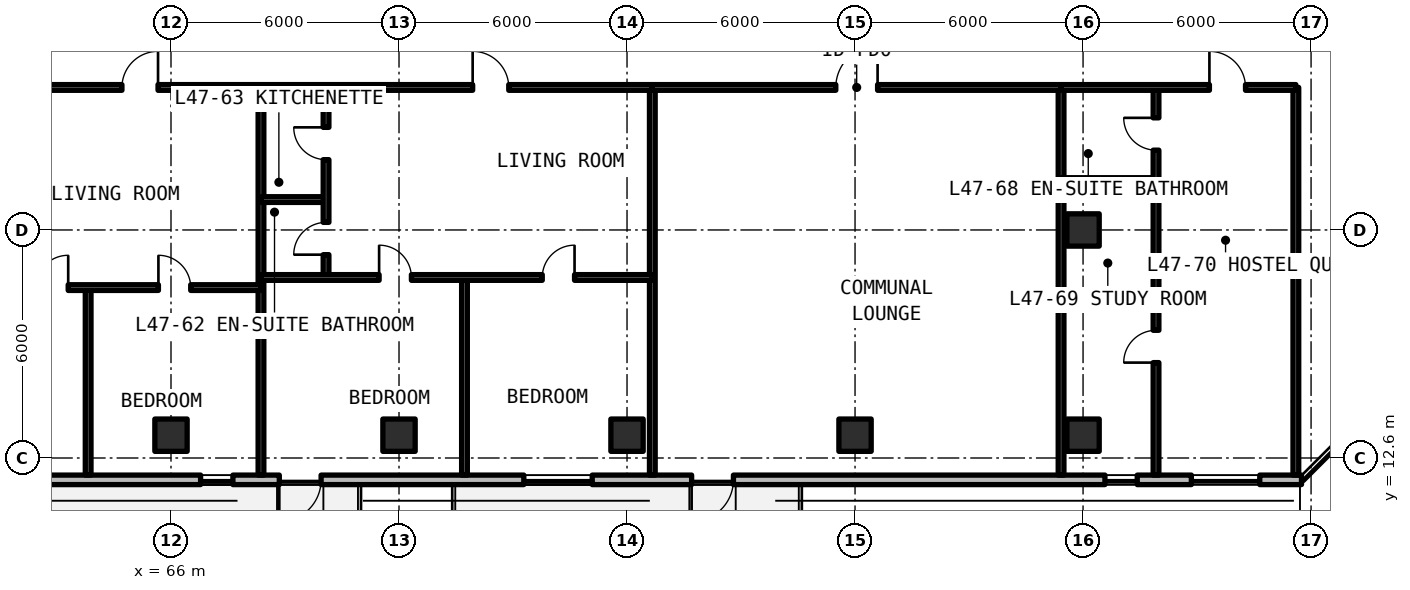
"""IFC4 building model, lengths in metres.
Left out: names, types, materials, properties, quantities, classifications, styles, units other than length and angle.
Written with IfcOpenShell. Run it as: python <this file> out.ifc"""

import sys

from ifc_helpers import new_model, si_unit, direction, frame, frame_2d, origin, origin_2d, place, context, subcontext, project, spatial, rectangle, extrude, element, fill, save


model = new_model("IFC4")
c1 = context("Model", 3, precision=1e-05, world=origin(), true_north=direction((0.0, 1.0)))
c2 = subcontext(c1, "Body", "Model", "MODEL_VIEW")
j1 = project(units=[si_unit("LENGTHUNIT", "METRE"), si_unit("PLANEANGLEUNIT", "RADIAN")], contexts=[c1])
p1 = place(None, origin())
s1 = spatial("IfcSite", under=j1, at=p1, CompositionType="ELEMENT")
p2 = place(p1, origin())
s2 = spatial("IfcBuilding", under=s1, at=p2, CompositionType="ELEMENT")
p3 = place(p2, frame((0.0, 0.0, 169.29)))
s3 = spatial("IfcBuildingStorey", under=s2, at=p3, CompositionType="ELEMENT", Elevation=169.29)
for number, where, z_axis, x_axis in (
    (1, (90.0, 18.6, 0.0), (0.0, 0.0, 1.0), (1.0, 0.0, 0.0)),
    (2, (66.0, 13.2, 0.0), (0.0, 0.0, 1.0), (1.0, 0.0, 0.0)),
    (3, (72.0, 13.2, 0.0), (0.0, 0.0, 1.0), (1.0, 0.0, 0.0)),
    (4, (78.0, 13.2, 0.0), (0.0, 0.0, 1.0), (1.0, 0.0, 0.0)),
    (5, (84.0, 13.2, 0.0), (0.0, 0.0, 1.0), (1.0, 0.0, 0.0)),
    (6, (90.0, 13.2, 0.0), (0.0, 0.0, 1.0), (1.0, 0.0, 0.0)),
):
    element("IfcColumn", number, at=place(p3, frame(where, z_axis=z_axis, x_axis=x_axis)), inside=s3, PredefinedType="COLUMN", context=c2, shape_type="SweptSolid", body=[
        extrude(rectangle(XDim=0.85, YDim=0.85, at=origin_2d()), origin(), (0.0, 0.0, 1.0), 3.63),
    ])
p4 = place(p3, frame((52.125, 12.025, 0.0), z_axis=(0.0, 0.0, 1.0), x_axis=(1.0, 0.0, 0.0)))
e7 = element("IfcWall", 7, at=p4, inside=s3, PredefinedType="SOLIDWALL", context=c2, shape_type="SweptSolid", body=[
    extrude(rectangle(XDim=43.623, YDim=0.25, at=frame_2d((21.812, 0.0))), origin(), (0.0, 0.0, 1.0), 3.35),
])
p5 = place(p4, frame((16.725, 0.0, 0.0)))
e8 = element("IfcOpeningElement", 8, at=p5, cuts=e7, PredefinedType="OPENING", context=c2, shape_type="SweptSolid", body=[
    extrude(rectangle(XDim=1.1, YDim=2.15, at=frame_2d((0.55, 1.075))), frame((0.0, 0.135, 0.0), z_axis=(0.0, -1.0, 0.0), x_axis=(1.0, 0.0, 0.0)), (0.0, 0.0, 1.0), 0.27),
])
p6 = place(p4, frame((27.575, 0.0, 0.0)))
e9 = element("IfcOpeningElement", 9, at=p6, cuts=e7, PredefinedType="OPENING", context=c2, shape_type="SweptSolid", body=[
    extrude(rectangle(XDim=1.1, YDim=2.15, at=frame_2d((0.55, 1.075))), frame((0.0, 0.135, 0.0), z_axis=(0.0, -1.0, 0.0), x_axis=(1.0, 0.0, 0.0)), (0.0, 0.0, 1.0), 0.27),
])
p7 = place(p4, frame((2.756, 0.0, 0.78)))
e10 = element("IfcOpeningElement", 10, at=p7, cuts=e7, PredefinedType="OPENING", context=c2, shape_type="SweptSolid", body=[
    extrude(rectangle(XDim=1.8, YDim=1.66, at=frame_2d((0.9, 0.83))), frame((0.0, 0.135, 0.0), z_axis=(0.0, -1.0, 0.0), x_axis=(1.0, 0.0, 0.0)), (0.0, 0.0, 1.0), 0.27),
])
p8 = place(p4, frame((8.776, 0.0, 0.78)))
e11 = element("IfcOpeningElement", 11, at=p8, cuts=e7, PredefinedType="OPENING", context=c2, shape_type="SweptSolid", body=[
    extrude(rectangle(XDim=1.8, YDim=1.66, at=frame_2d((0.9, 0.83))), frame((0.0, 0.135, 0.0), z_axis=(0.0, -1.0, 0.0), x_axis=(1.0, 0.0, 0.0)), (0.0, 0.0, 1.0), 0.27),
])
p9 = place(p4, frame((14.654, 0.0, 0.78)))
e12 = element("IfcOpeningElement", 12, at=p9, cuts=e7, PredefinedType="OPENING", context=c2, shape_type="SweptSolid", body=[
    extrude(rectangle(XDim=0.85, YDim=1.65, at=frame_2d((0.425, 0.825))), frame((0.0, 0.135, 0.0), z_axis=(0.0, -1.0, 0.0), x_axis=(1.0, 0.0, 0.0)), (0.0, 0.0, 1.0), 0.27),
])
p10 = place(p4, frame((23.159, 0.0, 0.78)))
e13 = element("IfcOpeningElement", 13, at=p10, cuts=e7, PredefinedType="OPENING", context=c2, shape_type="SweptSolid", body=[
    extrude(rectangle(XDim=1.8, YDim=1.66, at=frame_2d((0.9, 0.83))), frame((0.0, 0.135, 0.0), z_axis=(0.0, -1.0, 0.0), x_axis=(1.0, 0.0, 0.0)), (0.0, 0.0, 1.0), 0.27),
])
p11 = place(p4, frame((38.451, 0.0, 0.78)))
e14 = element("IfcOpeningElement", 14, at=p11, cuts=e7, PredefinedType="OPENING", context=c2, shape_type="SweptSolid", body=[
    extrude(rectangle(XDim=0.85, YDim=1.65, at=frame_2d((0.425, 0.825))), frame((0.0, 0.135, 0.0), z_axis=(0.0, -1.0, 0.0), x_axis=(1.0, 0.0, 0.0)), (0.0, 0.0, 1.0), 0.27),
])
p12 = place(p4, frame((40.725, 0.0, 0.78)))
e15 = element("IfcOpeningElement", 15, at=p12, cuts=e7, PredefinedType="OPENING", context=c2, shape_type="SweptSolid", body=[
    extrude(rectangle(XDim=1.8, YDim=1.66, at=frame_2d((0.9, 0.83))), frame((0.0, 0.135, 0.0), z_axis=(0.0, -1.0, 0.0), x_axis=(1.0, 0.0, 0.0)), (0.0, 0.0, 1.0), 0.27),
])
for number, where, z_axis, x_axis in (
    (16, (95.6, 12.15, 0.0), (0.0, 0.0, 1.0), (0.0, 1.0, 0.0)),
    (17, (68.368, 12.15, 0.0), (0.0, 0.0, 1.0), (0.0, 1.0, 0.0)),
):
    element("IfcWall", number, at=place(p3, frame(where, z_axis=z_axis, x_axis=x_axis)), inside=s3, PredefinedType="SOLIDWALL", context=c2, shape_type="SweptSolid", body=[
        extrude(rectangle(XDim=10.2, YDim=0.15, at=frame_2d((5.1, 0.0))), origin(), (0.0, 0.0, 1.0), 2.57),
    ])
p13 = place(p3, frame((63.82, 12.15, 0.0), z_axis=(0.0, 0.0, 1.0), x_axis=(0.0, 1.0, 0.0)))
e18 = element("IfcWall", 18, at=p13, inside=s3, PredefinedType="PARTITIONING", context=c2, shape_type="SweptSolid", body=[
    extrude(rectangle(XDim=4.934, YDim=0.15, at=frame_2d((2.467, 0.0))), origin(), (0.0, 0.0, 1.0), 2.57),
])
p14 = place(p3, frame((57.841, 17.084, 0.0), z_axis=(0.0, 0.0, 1.0), x_axis=(1.0, 0.0, 0.0)))
e19 = element("IfcWall", 19, at=p14, inside=s3, PredefinedType="PARTITIONING", context=c2, shape_type="SweptSolid", body=[
    extrude(rectangle(XDim=10.527, YDim=0.15, at=frame_2d((5.263, 0.0))), origin(), (0.0, 0.0, 1.0), 2.57),
])
p15 = place(p14, frame((4.604, 0.0, 0.0)))
e20 = element("IfcOpeningElement", 20, at=p15, cuts=e19, PredefinedType="OPENING", context=c2, shape_type="SweptSolid", body=[
    extrude(rectangle(XDim=0.85, YDim=2.1, at=frame_2d((0.425, 1.05))), frame((0.0, 0.085, 0.0), z_axis=(0.0, -1.0, 0.0), x_axis=(1.0, 0.0, 0.0)), (0.0, 0.0, 1.0), 0.17),
])
p16 = place(p14, frame((7.828, 0.0, 0.0)))
e21 = element("IfcOpeningElement", 21, at=p16, cuts=e19, PredefinedType="OPENING", context=c2, shape_type="SweptSolid", body=[
    extrude(rectangle(XDim=0.85, YDim=2.1, at=frame_2d((0.425, 1.05))), frame((0.0, 0.085, 0.0), z_axis=(0.0, -1.0, 0.0), x_axis=(1.0, 0.0, 0.0)), (0.0, 0.0, 1.0), 0.17),
])
p17 = place(p3, frame((57.841, 22.35, 0.0), z_axis=(0.0, 0.0, 1.0), x_axis=(1.0, 0.0, 0.0)))
e22 = element("IfcWall", 22, at=p17, inside=s3, PredefinedType="SOLIDWALL", context=c2, shape_type="SweptSolid", body=[
    extrude(rectangle(XDim=10.527, YDim=0.15, at=frame_2d((5.263, 0.0))), origin(), (0.0, 0.0, 1.0), 2.57),
])
p18 = place(p17, frame((6.868, 0.0, 0.0)))
e23 = element("IfcOpeningElement", 23, at=p18, cuts=e22, PredefinedType="OPENING", context=c2, shape_type="SweptSolid", body=[
    extrude(rectangle(XDim=0.95, YDim=2.15, at=frame_2d((0.475, 1.075))), frame((0.0, 0.085, 0.0), z_axis=(0.0, -1.0, 0.0), x_axis=(1.0, 0.0, 0.0)), (0.0, 0.0, 1.0), 0.17),
])
p19 = place(p3, frame((78.666, 12.15, 0.0), z_axis=(0.0, 0.0, 1.0), x_axis=(0.0, 1.0, 0.0)))
e24 = element("IfcWall", 24, at=p19, inside=s3, PredefinedType="SOLIDWALL", context=c2, shape_type="SweptSolid", body=[
    extrude(rectangle(XDim=10.2, YDim=0.15, at=frame_2d((5.1, 0.0))), origin(), (0.0, 0.0, 1.0), 2.57),
])
p20 = place(p3, frame((68.368, 19.4, 0.0), z_axis=(0.0, 0.0, 1.0), x_axis=(1.0, 0.0, 0.0)))
e25 = element("IfcWall", 25, at=p20, inside=s3, PredefinedType="PARTITIONING", context=c2, shape_type="SweptSolid", body=[
    extrude(rectangle(XDim=1.712, YDim=0.15, at=frame_2d((0.856, 0.0))), origin(), (0.0, 0.0, 1.0), 2.57),
])
p21 = place(p3, frame((70.08, 17.35, 0.0), z_axis=(0.0, 0.0, 1.0), x_axis=(0.0, 1.0, 0.0)))
e26 = element("IfcWall", 26, at=p21, inside=s3, PredefinedType="PARTITIONING", context=c2, shape_type="SweptSolid", body=[
    extrude(rectangle(XDim=5.0, YDim=0.15, at=frame_2d((2.5, 0.0))), origin(), (0.0, 0.0, 1.0), 2.57),
])
p22 = place(p21, frame((0.6, 0.0, 0.0)))
e27 = element("IfcOpeningElement", 27, at=p22, cuts=e26, PredefinedType="OPENING", context=c2, shape_type="SweptSolid", body=[
    extrude(rectangle(XDim=0.85, YDim=2.1, at=frame_2d((0.425, 1.05))), frame((0.0, 0.085, 0.0), z_axis=(0.0, -1.0, 0.0), x_axis=(1.0, 0.0, 0.0)), (0.0, 0.0, 1.0), 0.17),
])
p23 = place(p21, frame((3.1, 0.0, 0.0)))
e28 = element("IfcOpeningElement", 28, at=p23, cuts=e26, PredefinedType="OPENING", context=c2, shape_type="SweptSolid", body=[
    extrude(rectangle(XDim=0.85, YDim=2.1, at=frame_2d((0.425, 1.05))), frame((0.0, 0.085, 0.0), z_axis=(0.0, -1.0, 0.0), x_axis=(1.0, 0.0, 0.0)), (0.0, 0.0, 1.0), 0.17),
])
p24 = place(p3, frame((73.723, 12.15, 0.0), z_axis=(0.0, 0.0, 1.0), x_axis=(0.0, 1.0, 0.0)))
e29 = element("IfcWall", 29, at=p24, inside=s3, PredefinedType="PARTITIONING", context=c2, shape_type="SweptSolid", body=[
    extrude(rectangle(XDim=5.2, YDim=0.15, at=frame_2d((2.6, 0.0))), origin(), (0.0, 0.0, 1.0), 2.57),
])
p25 = place(p3, frame((68.368, 17.35, 0.0), z_axis=(0.0, 0.0, 1.0), x_axis=(1.0, 0.0, 0.0)))
e30 = element("IfcWall", 30, at=p25, inside=s3, PredefinedType="PARTITIONING", context=c2, shape_type="SweptSolid", body=[
    extrude(rectangle(XDim=10.298, YDim=0.15, at=frame_2d((5.149, 0.0))), origin(), (0.0, 0.0, 1.0), 2.57),
])
p26 = place(p25, frame((3.109, 0.0, 0.0)))
e31 = element("IfcOpeningElement", 31, at=p26, cuts=e30, PredefinedType="OPENING", context=c2, shape_type="SweptSolid", body=[
    extrude(rectangle(XDim=0.85, YDim=2.1, at=frame_2d((0.425, 1.05))), frame((0.0, 0.085, 0.0), z_axis=(0.0, -1.0, 0.0), x_axis=(1.0, 0.0, 0.0)), (0.0, 0.0, 1.0), 0.17),
])
p27 = place(p25, frame((7.401, 0.0, 0.0)))
e32 = element("IfcOpeningElement", 32, at=p27, cuts=e30, PredefinedType="OPENING", context=c2, shape_type="SweptSolid", body=[
    extrude(rectangle(XDim=0.85, YDim=2.1, at=frame_2d((0.425, 1.05))), frame((0.0, 0.085, 0.0), z_axis=(0.0, -1.0, 0.0), x_axis=(1.0, 0.0, 0.0)), (0.0, 0.0, 1.0), 0.17),
])
p28 = place(p3, frame((68.368, 22.35, 0.0), z_axis=(0.0, 0.0, 1.0), x_axis=(1.0, 0.0, 0.0)))
e33 = element("IfcWall", 33, at=p28, inside=s3, PredefinedType="SOLIDWALL", context=c2, shape_type="SweptSolid", body=[
    extrude(rectangle(XDim=10.298, YDim=0.15, at=frame_2d((5.149, 0.0))), origin(), (0.0, 0.0, 1.0), 2.57),
])
p29 = place(p28, frame((5.57, 0.0, 0.0)))
e34 = element("IfcOpeningElement", 34, at=p29, cuts=e33, PredefinedType="OPENING", context=c2, shape_type="SweptSolid", body=[
    extrude(rectangle(XDim=0.95, YDim=2.15, at=frame_2d((0.475, 1.075))), frame((0.0, 0.085, 0.0), z_axis=(0.0, -1.0, 0.0), x_axis=(1.0, 0.0, 0.0)), (0.0, 0.0, 1.0), 0.17),
])
p30 = place(p3, frame((89.421, 12.15, 0.0), z_axis=(0.0, 0.0, 1.0), x_axis=(0.0, 1.0, 0.0)))
e35 = element("IfcWall", 35, at=p30, inside=s3, PredefinedType="SOLIDWALL", context=c2, shape_type="SweptSolid", body=[
    extrude(rectangle(XDim=10.2, YDim=0.15, at=frame_2d((5.1, 0.0))), origin(), (0.0, 0.0, 1.0), 2.57),
])
p31 = place(p3, frame((78.666, 22.35, 0.0), z_axis=(0.0, 0.0, 1.0), x_axis=(1.0, 0.0, 0.0)))
e36 = element("IfcWall", 36, at=p31, inside=s3, PredefinedType="SOLIDWALL", context=c2, shape_type="SweptSolid", body=[
    extrude(rectangle(XDim=10.756, YDim=0.15, at=frame_2d((5.378, 0.0))), origin(), (0.0, 0.0, 1.0), 2.57),
])
p32 = place(p31, frame((4.828, 0.0, 0.0)))
e37 = element("IfcOpeningElement", 37, at=p32, cuts=e36, PredefinedType="OPENING", context=c2, shape_type="SweptSolid", body=[
    extrude(rectangle(XDim=1.1, YDim=2.15, at=frame_2d((0.55, 1.075))), frame((0.0, 0.085, 0.0), z_axis=(0.0, -1.0, 0.0), x_axis=(1.0, 0.0, 0.0)), (0.0, 0.0, 1.0), 0.17),
])
p33 = place(p3, frame((89.421, 19.9, 0.0), z_axis=(0.0, 0.0, 1.0), x_axis=(1.0, 0.0, 0.0)))
e38 = element("IfcWall", 38, at=p33, inside=s3, PredefinedType="PARTITIONING", context=c2, shape_type="SweptSolid", body=[
    extrude(rectangle(XDim=2.499, YDim=0.15, at=frame_2d((1.249, 0.0))), origin(), (0.0, 0.0, 1.0), 2.57),
])
p34 = place(p3, frame((91.92, 12.15, 0.0), z_axis=(0.0, 0.0, 1.0), x_axis=(0.0, 1.0, 0.0)))
e39 = element("IfcWall", 39, at=p34, inside=s3, PredefinedType="PARTITIONING", context=c2, shape_type="SweptSolid", body=[
    extrude(rectangle(XDim=10.2, YDim=0.15, at=frame_2d((5.1, 0.0))), origin(), (0.0, 0.0, 1.0), 2.57),
])
p35 = place(p34, frame((2.96, 0.0, 0.0)))
e40 = element("IfcOpeningElement", 40, at=p35, cuts=e39, PredefinedType="OPENING", context=c2, shape_type="SweptSolid", body=[
    extrude(rectangle(XDim=0.85, YDim=2.1, at=frame_2d((0.425, 1.05))), frame((0.0, 0.085, 0.0), z_axis=(0.0, -1.0, 0.0), x_axis=(1.0, 0.0, 0.0)), (0.0, 0.0, 1.0), 0.17),
])
p36 = place(p34, frame((8.55, 0.0, 0.0)))
e41 = element("IfcOpeningElement", 41, at=p36, cuts=e39, PredefinedType="OPENING", context=c2, shape_type="SweptSolid", body=[
    extrude(rectangle(XDim=0.85, YDim=2.1, at=frame_2d((0.425, 1.05))), frame((0.0, 0.085, 0.0), z_axis=(0.0, -1.0, 0.0), x_axis=(1.0, 0.0, 0.0)), (0.0, 0.0, 1.0), 0.17),
])
p37 = place(p3, frame((89.421, 22.35, 0.0), z_axis=(0.0, 0.0, 1.0), x_axis=(1.0, 0.0, 0.0)))
e42 = element("IfcWall", 42, at=p37, inside=s3, PredefinedType="SOLIDWALL", context=c2, shape_type="SweptSolid", body=[
    extrude(rectangle(XDim=6.179, YDim=0.15, at=frame_2d((3.089, 0.0))), origin(), (0.0, 0.0, 1.0), 2.57),
])
p38 = place(p37, frame((3.904, 0.0, 0.0)))
e43 = element("IfcOpeningElement", 43, at=p38, cuts=e42, PredefinedType="OPENING", context=c2, shape_type="SweptSolid", body=[
    extrude(rectangle(XDim=0.95, YDim=2.15, at=frame_2d((0.475, 1.075))), frame((0.0, 0.085, 0.0), z_axis=(0.0, -1.0, 0.0), x_axis=(1.0, 0.0, 0.0)), (0.0, 0.0, 1.0), 0.17),
])
p39 = place(p5, frame((1.1, 0.0, 0.0), z_axis=(0.0, 0.0, 1.0), x_axis=(-1.0, 0.0, 0.0)))
e44 = element("IfcDoor", 44, at=p39, inside=s3, OperationType="SINGLE_SWING_LEFT", PredefinedType="DOOR", context=c2, shape_type="SweptSolid", body=[
    extrude(rectangle(XDim=1.1, YDim=2.15, at=frame_2d((0.55, 1.075))), frame((0.0, 0.025, 0.0), z_axis=(0.0, -1.0, 0.0), x_axis=(1.0, 0.0, 0.0)), (0.0, 0.0, 1.0), 0.05),
])
fill(e8, e44)
p40 = place(p6, frame((1.1, 0.0, 0.0), z_axis=(0.0, 0.0, 1.0), x_axis=(-1.0, 0.0, 0.0)))
e45 = element("IfcDoor", 45, at=p40, inside=s3, OperationType="SINGLE_SWING_RIGHT", PredefinedType="DOOR", context=c2, shape_type="SweptSolid", body=[
    extrude(rectangle(XDim=1.1, YDim=2.15, at=frame_2d((0.55, 1.075))), frame((0.0, 0.025, 0.0), z_axis=(0.0, -1.0, 0.0), x_axis=(1.0, 0.0, 0.0)), (0.0, 0.0, 1.0), 0.05),
])
fill(e9, e45)
p41 = place(p9, origin())
e46 = element("IfcWindow", 46, at=p41, inside=s3, PartitioningType="SINGLE_PANEL", PredefinedType="WINDOW", context=c2, shape_type="SweptSolid", body=[
    extrude(rectangle(XDim=0.85, YDim=1.65, at=frame_2d((0.425, 0.825))), frame((0.0, 0.03, 0.0), z_axis=(0.0, -1.0, 0.0), x_axis=(1.0, 0.0, 0.0)), (0.0, 0.0, 1.0), 0.06),
])
fill(e12, e46)
p42 = place(p10, origin())
e47 = element("IfcWindow", 47, at=p42, inside=s3, PartitioningType="SINGLE_PANEL", PredefinedType="WINDOW", context=c2, shape_type="SweptSolid", body=[
    extrude(rectangle(XDim=1.8, YDim=1.66, at=frame_2d((0.9, 0.83))), frame((0.0, 0.03, 0.0), z_axis=(0.0, -1.0, 0.0), x_axis=(1.0, 0.0, 0.0)), (0.0, 0.0, 1.0), 0.06),
])
fill(e13, e47)
p43 = place(p11, origin())
e48 = element("IfcWindow", 48, at=p43, inside=s3, PartitioningType="SINGLE_PANEL", PredefinedType="WINDOW", context=c2, shape_type="SweptSolid", body=[
    extrude(rectangle(XDim=0.85, YDim=1.65, at=frame_2d((0.425, 0.825))), frame((0.0, 0.03, 0.0), z_axis=(0.0, -1.0, 0.0), x_axis=(1.0, 0.0, 0.0)), (0.0, 0.0, 1.0), 0.06),
])
fill(e14, e48)
p44 = place(p12, origin())
e49 = element("IfcWindow", 49, at=p44, inside=s3, PartitioningType="SINGLE_PANEL", PredefinedType="WINDOW", context=c2, shape_type="SweptSolid", body=[
    extrude(rectangle(XDim=1.8, YDim=1.66, at=frame_2d((0.9, 0.83))), frame((0.0, 0.03, 0.0), z_axis=(0.0, -1.0, 0.0), x_axis=(1.0, 0.0, 0.0)), (0.0, 0.0, 1.0), 0.06),
])
fill(e15, e49)
p45 = place(p15, origin())
e50 = element("IfcDoor", 50, at=p45, inside=s3, OperationType="SINGLE_SWING_RIGHT", PredefinedType="DOOR", context=c2, shape_type="SweptSolid", body=[
    extrude(rectangle(XDim=0.85, YDim=2.1, at=frame_2d((0.425, 1.05))), frame((0.0, 0.025, 0.0), z_axis=(0.0, -1.0, 0.0), x_axis=(1.0, 0.0, 0.0)), (0.0, 0.0, 1.0), 0.05),
])
fill(e20, e50)
p46 = place(p16, origin())
e51 = element("IfcDoor", 51, at=p46, inside=s3, OperationType="SINGLE_SWING_LEFT", PredefinedType="DOOR", context=c2, shape_type="SweptSolid", body=[
    extrude(rectangle(XDim=0.85, YDim=2.1, at=frame_2d((0.425, 1.05))), frame((0.0, 0.025, 0.0), z_axis=(0.0, -1.0, 0.0), x_axis=(1.0, 0.0, 0.0)), (0.0, 0.0, 1.0), 0.05),
])
fill(e21, e51)
p47 = place(p18, origin())
e52 = element("IfcDoor", 52, at=p47, inside=s3, OperationType="SINGLE_SWING_RIGHT", PredefinedType="DOOR", context=c2, shape_type="SweptSolid", body=[
    extrude(rectangle(XDim=0.95, YDim=2.15, at=frame_2d((0.475, 1.075))), frame((0.0, 0.025, 0.0), z_axis=(0.0, -1.0, 0.0), x_axis=(1.0, 0.0, 0.0)), (0.0, 0.0, 1.0), 0.05),
])
fill(e23, e52)
p48 = place(p22, origin())
e53 = element("IfcDoor", 53, at=p48, inside=s3, OperationType="SINGLE_SWING_LEFT", PredefinedType="DOOR", context=c2, shape_type="SweptSolid", body=[
    extrude(rectangle(XDim=0.85, YDim=2.1, at=frame_2d((0.425, 1.05))), frame((0.0, 0.025, 0.0), z_axis=(0.0, -1.0, 0.0), x_axis=(1.0, 0.0, 0.0)), (0.0, 0.0, 1.0), 0.05),
])
fill(e27, e53)
p49 = place(p23, origin())
e54 = element("IfcDoor", 54, at=p49, inside=s3, OperationType="SINGLE_SWING_RIGHT", PredefinedType="DOOR", context=c2, shape_type="SweptSolid", body=[
    extrude(rectangle(XDim=0.85, YDim=2.1, at=frame_2d((0.425, 1.05))), frame((0.0, 0.025, 0.0), z_axis=(0.0, -1.0, 0.0), x_axis=(1.0, 0.0, 0.0)), (0.0, 0.0, 1.0), 0.05),
])
fill(e28, e54)
p50 = place(p26, origin())
e55 = element("IfcDoor", 55, at=p50, inside=s3, OperationType="SINGLE_SWING_LEFT", PredefinedType="DOOR", context=c2, shape_type="SweptSolid", body=[
    extrude(rectangle(XDim=0.85, YDim=2.1, at=frame_2d((0.425, 1.05))), frame((0.0, 0.025, 0.0), z_axis=(0.0, -1.0, 0.0), x_axis=(1.0, 0.0, 0.0)), (0.0, 0.0, 1.0), 0.05),
])
fill(e31, e55)
p51 = place(p27, origin())
e56 = element("IfcDoor", 56, at=p51, inside=s3, OperationType="SINGLE_SWING_RIGHT", PredefinedType="DOOR", context=c2, shape_type="SweptSolid", body=[
    extrude(rectangle(XDim=0.85, YDim=2.1, at=frame_2d((0.425, 1.05))), frame((0.0, 0.025, 0.0), z_axis=(0.0, -1.0, 0.0), x_axis=(1.0, 0.0, 0.0)), (0.0, 0.0, 1.0), 0.05),
])
fill(e32, e56)
p52 = place(p29, origin())
e57 = element("IfcDoor", 57, at=p52, inside=s3, OperationType="SINGLE_SWING_LEFT", PredefinedType="DOOR", context=c2, shape_type="SweptSolid", body=[
    extrude(rectangle(XDim=0.95, YDim=2.15, at=frame_2d((0.475, 1.075))), frame((0.0, 0.025, 0.0), z_axis=(0.0, -1.0, 0.0), x_axis=(1.0, 0.0, 0.0)), (0.0, 0.0, 1.0), 0.05),
])
fill(e34, e57)
p53 = place(p32, origin())
e58 = element("IfcDoor", 58, at=p53, inside=s3, OperationType="SINGLE_SWING_RIGHT", PredefinedType="DOOR", context=c2, shape_type="SweptSolid", body=[
    extrude(rectangle(XDim=1.1, YDim=2.15, at=frame_2d((0.55, 1.075))), frame((0.0, 0.025, 0.0), z_axis=(0.0, -1.0, 0.0), x_axis=(1.0, 0.0, 0.0)), (0.0, 0.0, 1.0), 0.05),
])
fill(e37, e58)
p54 = place(p35, origin())
e59 = element("IfcDoor", 59, at=p54, inside=s3, OperationType="SINGLE_SWING_LEFT", PredefinedType="DOOR", context=c2, shape_type="SweptSolid", body=[
    extrude(rectangle(XDim=0.85, YDim=2.1, at=frame_2d((0.425, 1.05))), frame((0.0, 0.025, 0.0), z_axis=(0.0, -1.0, 0.0), x_axis=(1.0, 0.0, 0.0)), (0.0, 0.0, 1.0), 0.05),
])
fill(e40, e59)
p55 = place(p36, origin())
e60 = element("IfcDoor", 60, at=p55, inside=s3, OperationType="SINGLE_SWING_RIGHT", PredefinedType="DOOR", context=c2, shape_type="SweptSolid", body=[
    extrude(rectangle(XDim=0.85, YDim=2.1, at=frame_2d((0.425, 1.05))), frame((0.0, 0.025, 0.0), z_axis=(0.0, -1.0, 0.0), x_axis=(1.0, 0.0, 0.0)), (0.0, 0.0, 1.0), 0.05),
])
fill(e41, e60)
p56 = place(p38, origin())
e61 = element("IfcDoor", 61, at=p56, inside=s3, OperationType="SINGLE_SWING_LEFT", PredefinedType="DOOR", context=c2, shape_type="SweptSolid", body=[
    extrude(rectangle(XDim=0.95, YDim=2.15, at=frame_2d((0.475, 1.075))), frame((0.0, 0.025, 0.0), z_axis=(0.0, -1.0, 0.0), x_axis=(1.0, 0.0, 0.0)), (0.0, 0.0, 1.0), 0.05),
])
fill(e43, e61)
save(model, sys.argv[1])
